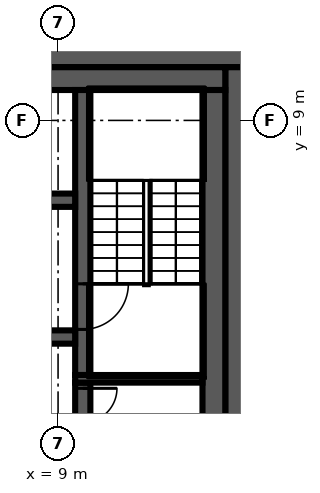
"""IFC4 building model, lengths in metres.
Left out: names, types, materials, properties, quantities, classifications, styles, units other than length and angle.
Written with IfcOpenShell. Run it as: python <this file> out.ifc"""

import sys

from ifc_helpers import new_model, si_unit, direction, frame, frame_2d, origin, place, context, subcontext, project, spatial, rectangle, extrude, element, fill, save


model = new_model("IFC4")
c1 = context("Model", 3, precision=1e-05, world=origin(), true_north=direction((0.0, 1.0)))
c2 = subcontext(c1, "Body", "Model", "MODEL_VIEW")
j1 = project(units=[si_unit("LENGTHUNIT", "METRE"), si_unit("PLANEANGLEUNIT", "RADIAN")], contexts=[c1])
p1 = place(None, origin())
s1 = spatial("IfcSite", under=j1, at=p1, CompositionType="ELEMENT")
p2 = place(p1, origin())
s2 = spatial("IfcBuilding", under=s1, at=p2, CompositionType="ELEMENT")
p3 = place(p2, frame((0.0, 0.0, 353.0)))
s3 = spatial("IfcBuildingStorey", under=s2, at=p3, CompositionType="ELEMENT", Elevation=353.0)
p4 = place(p3, frame((-14.0, 10.7, 0.0), z_axis=(0.0, 0.0, 1.0), x_axis=(1.0, 0.0, 0.0)))
e1 = element("IfcWall", 1, at=p4, inside=s3, PredefinedType="SHEAR", context=c2, shape_type="SweptSolid", body=[
    extrude(rectangle(XDim=28.0, YDim=0.6, at=frame_2d((14.0, 0.0))), origin(), (0.0, 0.0, 1.0), 5.6),
])
p5 = place(p4, frame((15.9, 0.0, 0.0)))
e2 = element("IfcOpeningElement", 2, at=p5, cuts=e1, PredefinedType="OPENING", context=c2, shape_type="SweptSolid", body=[
    extrude(rectangle(XDim=1.6, YDim=2.1, at=frame_2d((0.8, 1.05))), frame((0.0, 0.31, 0.0), z_axis=(0.0, -1.0, 0.0), x_axis=(1.0, 0.0, 0.0)), (0.0, 0.0, 1.0), 0.62),
])
p6 = place(p3, frame((13.7, 10.4, 0.0), z_axis=(0.0, 0.0, 1.0), x_axis=(0.0, -1.0, 0.0)))
e3 = element("IfcWall", 3, at=p6, inside=s3, PredefinedType="SHEAR", context=c2, shape_type="SweptSolid", body=[
    extrude(rectangle(XDim=20.8, YDim=0.6, at=frame_2d((10.4, 0.0))), origin(), (0.0, 0.0, 1.0), 5.6),
])
p7 = place(p3, frame((3.9, 10.1, 0.0), z_axis=(0.0, 0.0, 1.0), x_axis=(1.0, 0.0, 0.0)))
e4 = element("IfcWall", 4, at=p7, inside=s3, PredefinedType="SHEAR", context=c2, shape_type="SweptSolid", body=[
    extrude(rectangle(XDim=9.5, YDim=0.6, at=frame_2d((4.75, 0.0))), origin(), (0.0, 0.0, 1.0), 5.6),
])
p8 = place(p3, frame((13.1, 9.8, 0.0), z_axis=(0.0, 0.0, 1.0), x_axis=(0.0, -1.0, 0.0)))
e5 = element("IfcWall", 5, at=p8, inside=s3, PredefinedType="SHEAR", context=c2, shape_type="SweptSolid", body=[
    extrude(rectangle(XDim=19.6, YDim=0.6, at=frame_2d((9.8, 0.0))), origin(), (0.0, 0.0, 1.0), 5.6),
])
p9 = place(p3, frame((9.65, 2.1, 0.0), z_axis=(0.0, 0.0, 1.0), x_axis=(0.0, -1.0, 0.0)))
e6 = element("IfcWall", 6, at=p9, inside=s3, PredefinedType="SHEAR", context=c2, shape_type="SweptSolid", body=[
    extrude(rectangle(XDim=4.2, YDim=0.4, at=frame_2d((2.1, 0.0))), origin(), (0.0, 0.0, 1.0), 5.6),
])
p10 = place(p9, frame((0.15, 0.0, 0.0)))
e7 = element("IfcOpeningElement", 7, at=p10, cuts=e6, PredefinedType="OPENING", context=c2, shape_type="SweptSolid", body=[
    extrude(rectangle(XDim=0.9, YDim=2.1, at=frame_2d((0.45, 1.05))), frame((0.0, 0.21, 0.0), z_axis=(0.0, -1.0, 0.0), x_axis=(1.0, 0.0, 0.0)), (0.0, 0.0, 1.0), 0.42),
])
p11 = place(p3, frame((9.65, 9.8, 0.0), z_axis=(0.0, 0.0, 1.0), x_axis=(0.0, -1.0, 0.0)))
e8 = element("IfcWall", 8, at=p11, inside=s3, PredefinedType="SHEAR", context=c2, shape_type="SweptSolid", body=[
    extrude(rectangle(XDim=7.5, YDim=0.4, at=frame_2d((3.75, 0.0))), origin(), (0.0, 0.0, 1.0), 5.6),
])
p12 = place(p11, frame((5.1, 0.0, 0.0)))
e9 = element("IfcOpeningElement", 9, at=p12, cuts=e8, PredefinedType="OPENING", context=c2, shape_type="SweptSolid", body=[
    extrude(rectangle(XDim=1.2, YDim=2.1, at=frame_2d((0.6, 1.05))), frame((0.0, 0.21, 0.0), z_axis=(0.0, -1.0, 0.0), x_axis=(1.0, 0.0, 0.0)), (0.0, 0.0, 1.0), 0.42),
])
p13 = place(p3, frame((9.45, 2.2, 0.0), z_axis=(0.0, 0.0, 1.0), x_axis=(1.0, 0.0, 0.0)))
e10 = element("IfcWall", 10, at=p13, inside=s3, PredefinedType="SHEAR", context=c2, shape_type="SweptSolid", body=[
    extrude(rectangle(XDim=3.35, YDim=0.2, at=frame_2d((1.675, 0.0))), origin(), (0.0, 0.0, 1.0), 5.6),
])
p14 = place(p3, frame((-9.45, 6.9, 0.0), z_axis=(0.0, 0.0, 1.0), x_axis=(1.0, 0.0, 0.0)))
e11 = element("IfcWall", 11, at=p14, inside=s3, PredefinedType="SHEAR", context=c2, shape_type="SweptSolid", body=[
    extrude(rectangle(XDim=18.9, YDim=0.35, at=frame_2d((9.45, 0.0))), origin(), (0.0, 0.0, 1.0), 5.6),
])
p15 = place(p14, frame((11.55, 0.0, 0.0)))
e12 = element("IfcOpeningElement", 12, at=p15, cuts=e11, PredefinedType="OPENING", context=c2, shape_type="SweptSolid", body=[
    extrude(rectangle(XDim=1.2, YDim=2.1, at=frame_2d((0.6, 1.05))), frame((0.0, 0.185, 0.0), z_axis=(0.0, -1.0, 0.0), x_axis=(1.0, 0.0, 0.0)), (0.0, 0.0, 1.0), 0.37),
])
p16 = place(p14, frame((14.3, 0.0, 0.0)))
e13 = element("IfcOpeningElement", 13, at=p16, cuts=e11, PredefinedType="OPENING", context=c2, shape_type="SweptSolid", body=[
    extrude(rectangle(XDim=1.1, YDim=2.1, at=frame_2d((0.55, 1.05))), frame((0.0, 0.185, 0.0), z_axis=(0.0, -1.0, 0.0), x_axis=(1.0, 0.0, 0.0)), (0.0, 0.0, 1.0), 0.37),
])
p17 = place(p14, frame((17.0, 0.0, 0.0)))
e14 = element("IfcOpeningElement", 14, at=p17, cuts=e11, PredefinedType="OPENING", context=c2, shape_type="SweptSolid", body=[
    extrude(rectangle(XDim=1.1, YDim=2.1, at=frame_2d((0.55, 1.05))), frame((0.0, 0.185, 0.0), z_axis=(0.0, -1.0, 0.0), x_axis=(1.0, 0.0, 0.0)), (0.0, 0.0, 1.0), 0.37),
])
p18 = place(p14, frame((2.25, 0.0, 0.0)))
e15 = element("IfcOpeningElement", 15, at=p18, cuts=e11, PredefinedType="OPENING", context=c2, shape_type="SweptSolid", body=[
    extrude(rectangle(XDim=0.9, YDim=2.1, at=frame_2d((0.45, 1.05))), frame((0.0, 0.185, 0.0), z_axis=(0.0, -1.0, 0.0), x_axis=(1.0, 0.0, 0.0)), (0.0, 0.0, 1.0), 0.37),
])
p19 = place(p14, frame((7.65, 0.0, 0.0)))
e16 = element("IfcOpeningElement", 16, at=p19, cuts=e11, PredefinedType="OPENING", context=c2, shape_type="SweptSolid", body=[
    extrude(rectangle(XDim=0.9, YDim=2.1, at=frame_2d((0.45, 1.05))), frame((0.0, 0.185, 0.0), z_axis=(0.0, -1.0, 0.0), x_axis=(1.0, 0.0, 0.0)), (0.0, 0.0, 1.0), 0.37),
])
p20 = place(p3, frame((9.45, 3.3, 0.0), z_axis=(0.0, 0.0, 1.0), x_axis=(-1.0, 0.0, 0.0)))
e17 = element("IfcWall", 17, at=p20, inside=s3, PredefinedType="SHEAR", context=c2, shape_type="SweptSolid", body=[
    extrude(rectangle(XDim=18.9, YDim=0.35, at=frame_2d((9.45, 0.0))), origin(), (0.0, 0.0, 1.0), 5.6),
])
p21 = place(p20, frame((6.2, 0.0, 0.0)))
e18 = element("IfcOpeningElement", 18, at=p21, cuts=e17, PredefinedType="OPENING", context=c2, shape_type="SweptSolid", body=[
    extrude(rectangle(XDim=1.1, YDim=2.1, at=frame_2d((0.55, 1.05))), frame((0.0, 0.185, 0.0), z_axis=(0.0, -1.0, 0.0), x_axis=(1.0, 0.0, 0.0)), (0.0, 0.0, 1.0), 0.37),
])
p22 = place(p20, frame((3.5, 0.0, 0.0)))
e19 = element("IfcOpeningElement", 19, at=p22, cuts=e17, PredefinedType="OPENING", context=c2, shape_type="SweptSolid", body=[
    extrude(rectangle(XDim=1.1, YDim=2.1, at=frame_2d((0.55, 1.05))), frame((0.0, 0.185, 0.0), z_axis=(0.0, -1.0, 0.0), x_axis=(1.0, 0.0, 0.0)), (0.0, 0.0, 1.0), 0.37),
])
p23 = place(p20, frame((0.9, 0.0, 0.0)))
e20 = element("IfcOpeningElement", 20, at=p23, cuts=e17, PredefinedType="OPENING", context=c2, shape_type="SweptSolid", body=[
    extrude(rectangle(XDim=0.9, YDim=2.1, at=frame_2d((0.45, 1.05))), frame((0.0, 0.185, 0.0), z_axis=(0.0, -1.0, 0.0), x_axis=(1.0, 0.0, 0.0)), (0.0, 0.0, 1.0), 0.37),
])
p24 = place(p20, frame((15.75, 0.0, 0.0)))
e21 = element("IfcOpeningElement", 21, at=p24, cuts=e17, PredefinedType="OPENING", context=c2, shape_type="SweptSolid", body=[
    extrude(rectangle(XDim=0.9, YDim=2.1, at=frame_2d((0.45, 1.05))), frame((0.0, 0.185, 0.0), z_axis=(0.0, -1.0, 0.0), x_axis=(1.0, 0.0, 0.0)), (0.0, 0.0, 1.0), 0.37),
])
p25 = place(p20, frame((11.7, 0.0, 0.0)))
e22 = element("IfcOpeningElement", 22, at=p25, cuts=e17, PredefinedType="OPENING", context=c2, shape_type="SweptSolid", body=[
    extrude(rectangle(XDim=0.9, YDim=2.1, at=frame_2d((0.45, 1.05))), frame((0.0, 0.185, 0.0), z_axis=(0.0, -1.0, 0.0), x_axis=(1.0, 0.0, 0.0)), (0.0, 0.0, 1.0), 0.37),
])
p26 = place(p20, frame((9.0, 0.0, 0.0)))
e23 = element("IfcOpeningElement", 23, at=p26, cuts=e17, PredefinedType="OPENING", context=c2, shape_type="SweptSolid", body=[
    extrude(rectangle(XDim=0.9, YDim=2.1, at=frame_2d((0.45, 1.05))), frame((0.0, 0.185, 0.0), z_axis=(0.0, -1.0, 0.0), x_axis=(1.0, 0.0, 0.0)), (0.0, 0.0, 1.0), 0.37),
])
p27 = place(p10, origin())
e24 = element("IfcDoor", 24, at=p27, inside=s3, OperationType="SINGLE_SWING_RIGHT", PredefinedType="DOOR", context=c2, shape_type="SweptSolid", body=[
    extrude(rectangle(XDim=0.9, YDim=2.1, at=frame_2d((0.45, 1.05))), frame((0.0, 0.025, 0.0), z_axis=(0.0, -1.0, 0.0), x_axis=(1.0, 0.0, 0.0)), (0.0, 0.0, 1.0), 0.05),
])
fill(e7, e24)
p28 = place(p12, origin())
e25 = element("IfcDoor", 25, at=p28, inside=s3, OperationType="SINGLE_SWING_LEFT", PredefinedType="DOOR", context=c2, shape_type="SweptSolid", body=[
    extrude(rectangle(XDim=1.2, YDim=2.1, at=frame_2d((0.6, 1.05))), frame((0.0, 0.025, 0.0), z_axis=(0.0, -1.0, 0.0), x_axis=(1.0, 0.0, 0.0)), (0.0, 0.0, 1.0), 0.05),
])
fill(e9, e25)
save(model, sys.argv[1])
